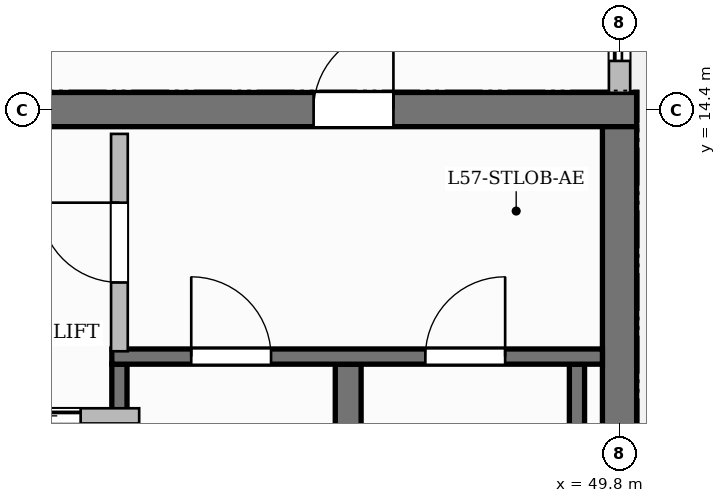
"""IFC4 building model, lengths in metres.
Left out: names, types, materials, properties, quantities, classifications, styles, units other than length and angle.
Written with IfcOpenShell. Run it as: python <this file> out.ifc"""

import sys

from ifc_helpers import new_model, si_unit, direction, frame, frame_2d, origin, place, context, subcontext, project, spatial, rectangle, extrude, source, transform, mapped, element, fill, save


model = new_model("IFC4")
c1 = context("Model", 3, precision=1e-05, world=origin(), true_north=direction((0.0, 1.0)))
c2 = subcontext(c1, "Body", "Model", "MODEL_VIEW")
j1 = project(units=[si_unit("LENGTHUNIT", "METRE"), si_unit("PLANEANGLEUNIT", "RADIAN")], contexts=[c1])
p1 = place(None, origin())
s1 = spatial("IfcSite", under=j1, at=p1, CompositionType="ELEMENT")
p2 = place(p1, origin())
s2 = spatial("IfcBuilding", under=s1, at=p2, CompositionType="ELEMENT")
p3 = place(p2, frame((0.0, 0.0, 228.85)))
s3 = spatial("IfcBuildingStorey", under=s2, at=p3, CompositionType="ELEMENT", Elevation=228.85)
p4 = place(p3, frame((34.575, 14.4, 0.0), z_axis=(0.0, 0.0, 1.0), x_axis=(1.0, 0.0, 0.0)))
e1 = element("IfcWall", 1, at=p4, inside=s3, PredefinedType="SHEAR", context=c2, shape_type="SweptSolid", body=[
    extrude(rectangle(XDim=15.45, YDim=0.45, at=frame_2d((7.725, 0.0))), origin(), (0.0, 0.0, 1.0), 3.85),
])
p5 = place(p4, frame((5.355, 0.0, 0.0)))
e2 = element("IfcOpeningElement", 2, at=p5, cuts=e1, PredefinedType="OPENING", context=c2, shape_type="SweptSolid", body=[
    extrude(rectangle(XDim=1.5, YDim=2.2, at=frame_2d((0.75, 1.1))), frame((0.0, 0.235, 0.0), z_axis=(0.0, -1.0, 0.0), x_axis=(1.0, 0.0, 0.0)), (0.0, 0.0, 1.0), 0.47),
])
p6 = place(p4, frame((1.57, 0.0, 0.0)))
e3 = element("IfcOpeningElement", 3, at=p6, cuts=e1, PredefinedType="OPENING", context=c2, shape_type="SweptSolid", body=[
    extrude(rectangle(XDim=1.05, YDim=2.15, at=frame_2d((0.525, 1.075))), frame((0.0, 0.235, 0.0), z_axis=(0.0, -1.0, 0.0), x_axis=(1.0, 0.0, 0.0)), (0.0, 0.0, 1.0), 0.47),
])
p7 = place(p4, frame((11.2, 0.0, 0.0)))
e4 = element("IfcOpeningElement", 4, at=p7, cuts=e1, PredefinedType="OPENING", context=c2, shape_type="SweptSolid", body=[
    extrude(rectangle(XDim=1.05, YDim=2.15, at=frame_2d((0.525, 1.075))), frame((0.0, 0.235, 0.0), z_axis=(0.0, -1.0, 0.0), x_axis=(1.0, 0.0, 0.0)), (0.0, 0.0, 1.0), 0.47),
])
p8 = place(p3, frame((49.8, 3.825, 0.0), z_axis=(0.0, 0.0, 1.0), x_axis=(0.0, 1.0, 0.0)))
e5 = element("IfcWall", 5, at=p8, inside=s3, PredefinedType="SHEAR", context=c2, shape_type="SweptSolid", body=[
    extrude(rectangle(XDim=10.35, YDim=0.45, at=frame_2d((5.175, 0.0))), origin(), (0.0, 0.0, 1.0), 3.85),
])
p9 = place(p3, frame((43.22, 4.1, 0.0), z_axis=(0.0, 0.0, 1.0), x_axis=(0.0, 1.0, 0.0)))
e6 = element("IfcWall", 6, at=p9, inside=s3, PredefinedType="SHEAR", context=c2, shape_type="SweptSolid", body=[
    extrude(rectangle(XDim=6.95, YDim=0.2, at=frame_2d((3.475, 0.0))), origin(), (0.0, 0.0, 1.0), 3.85),
])
p10 = place(p3, frame((46.23, 4.1, 0.0), z_axis=(0.0, 0.0, 1.0), x_axis=(0.0, 1.0, 0.0)))
e7 = element("IfcWall", 7, at=p10, inside=s3, PredefinedType="SHEAR", context=c2, shape_type="SweptSolid", body=[
    extrude(rectangle(XDim=6.95, YDim=0.34, at=frame_2d((3.475, 0.0))), origin(), (0.0, 0.0, 1.0), 3.85),
])
p11 = place(p3, frame((49.24, 4.1, 0.0), z_axis=(0.0, 0.0, 1.0), x_axis=(0.0, 1.0, 0.0)))
e8 = element("IfcWall", 8, at=p11, inside=s3, PredefinedType="SHEAR", context=c2, shape_type="SweptSolid", body=[
    extrude(rectangle(XDim=6.95, YDim=0.2, at=frame_2d((3.475, 0.0))), origin(), (0.0, 0.0, 1.0), 3.85),
])
p12 = place(p3, frame((43.12, 11.15, 0.0), z_axis=(0.0, 0.0, 1.0), x_axis=(1.0, 0.0, 0.0)))
e9 = element("IfcWall", 9, at=p12, inside=s3, PredefinedType="SHEAR", context=c2, shape_type="SweptSolid", body=[
    extrude(rectangle(XDim=6.455, YDim=0.2, at=frame_2d((3.228, 0.0))), origin(), (0.0, 0.0, 1.0), 3.85),
])
p13 = place(p12, frame((1.045, 0.0, 0.0)))
e10 = element("IfcOpeningElement", 10, at=p13, cuts=e9, PredefinedType="OPENING", context=c2, shape_type="SweptSolid", body=[
    extrude(rectangle(XDim=1.05, YDim=2.2, at=frame_2d((0.525, 1.1))), frame((0.0, 0.11, 0.0), z_axis=(0.0, -1.0, 0.0), x_axis=(1.0, 0.0, 0.0)), (0.0, 0.0, 1.0), 0.22),
])
p14 = place(p12, frame((4.125, 0.0, 0.0)))
e11 = element("IfcOpeningElement", 11, at=p14, cuts=e9, PredefinedType="OPENING", context=c2, shape_type="SweptSolid", body=[
    extrude(rectangle(XDim=1.05, YDim=2.2, at=frame_2d((0.525, 1.1))), frame((0.0, 0.11, 0.0), z_axis=(0.0, -1.0, 0.0), x_axis=(1.0, 0.0, 0.0)), (0.0, 0.0, 1.0), 0.22),
])
p15 = place(p3, frame((43.22, 11.22, 0.0), z_axis=(0.0, 0.0, 1.0), x_axis=(0.0, 1.0, 0.0)))
e12 = element("IfcWall", 12, at=p15, inside=s3, PredefinedType="PARTITIONING", context=c2, shape_type="SweptSolid", body=[
    extrude(rectangle(XDim=2.86, YDim=0.22, at=frame_2d((1.43, 0.0))), origin(), (0.0, 0.0, 1.0), 3.6),
])
p16 = place(p15, frame((0.905, 0.0, 0.0)))
e13 = element("IfcOpeningElement", 13, at=p16, cuts=e12, PredefinedType="OPENING", context=c2, shape_type="SweptSolid", body=[
    extrude(rectangle(XDim=1.05, YDim=2.15, at=frame_2d((0.525, 1.075))), frame((0.0, 0.12, 0.0), z_axis=(0.0, -1.0, 0.0), x_axis=(1.0, 0.0, 0.0)), (0.0, 0.0, 1.0), 0.24),
])
p17 = place(p3, frame((40.84, 10.37, 0.0), z_axis=(0.0, 0.0, 1.0), x_axis=(1.0, 0.0, 0.0)))
e14 = element("IfcWall", 14, at=p17, inside=s3, PredefinedType="PARTITIONING", context=c2, shape_type="SweptSolid", body=[
    extrude(rectangle(XDim=2.64, YDim=0.2, at=frame_2d((1.32, 0.0))), origin(), (0.0, 0.0, 1.0), 3.6),
])
p18 = place(p17, frame((0.77, 0.0, 0.0)))
e15 = element("IfcOpeningElement", 15, at=p18, cuts=e14, PredefinedType="OPENING", context=c2, shape_type="SweptSolid", body=[
    extrude(rectangle(XDim=1.1, YDim=2.2, at=frame_2d((0.55, 1.1))), frame((0.0, 0.11, 0.0), z_axis=(0.0, -1.0, 0.0), x_axis=(1.0, 0.0, 0.0)), (0.0, 0.0, 1.0), 0.22),
])
p19 = place(p3, frame((49.8, 14.62, 0.0), z_axis=(0.0, 0.0, 1.0), x_axis=(0.0, 1.0, 0.0)))
e16 = element("IfcWall", 16, at=p19, inside=s3, PredefinedType="SOLIDWALL", context=c2, shape_type="SweptSolid", body=[
    extrude(rectangle(XDim=6.93, YDim=0.28, at=frame_2d((3.465, 0.0))), origin(), (0.0, 0.0, 1.0), 3.135),
])
p20 = place(p19, frame((0.42, 0.0, 0.0)))
e17 = element("IfcOpeningElement", 17, at=p20, cuts=e16, PredefinedType="OPENING", context=c2, shape_type="SweptSolid", body=[
    extrude(rectangle(XDim=1.2, YDim=2.2, at=frame_2d((0.6, 1.1))), frame((0.0, 0.15, 0.0), z_axis=(0.0, -1.0, 0.0), x_axis=(1.0, 0.0, 0.0)), (0.0, 0.0, 1.0), 0.3),
])
p21 = place(p19, frame((3.384, 0.0, 0.8)))
e18 = element("IfcOpeningElement", 18, at=p21, cuts=e16, PredefinedType="OPENING", context=c2, shape_type="SweptSolid", body=[
    extrude(rectangle(XDim=1.8, YDim=1.85, at=frame_2d((0.9, 0.925))), frame((0.0, 0.15, 0.0), z_axis=(0.0, -1.0, 0.0), x_axis=(1.0, 0.0, 0.0)), (0.0, 0.0, 1.0), 0.3),
])
m1 = source(origin(), c2, "Body", "SweptSolid", [
    extrude(rectangle(XDim=1.05, YDim=2.2, at=frame_2d((0.525, 1.1))), frame((0.0, 0.025, 0.0), z_axis=(0.0, -1.0, 0.0), x_axis=(1.0, 0.0, 0.0)), (0.0, 0.0, 1.0), 0.05),
])
p22 = place(p13, origin())
e19 = element("IfcDoor", 19, at=p22, inside=s3, OperationType="SINGLE_SWING_LEFT", PredefinedType="DOOR", context=c2, shape_type="MappedRepresentation", body=[
    mapped(m1, transform((0.0, 0.0, 0.0), scale=1.0)),
])
fill(e10, e19)
p23 = place(p14, origin())
e20 = element("IfcDoor", 20, at=p23, inside=s3, OperationType="SINGLE_SWING_RIGHT", PredefinedType="DOOR", context=c2, shape_type="MappedRepresentation", body=[
    mapped(m1, transform((0.0, 0.0, 0.0), scale=1.0)),
])
fill(e11, e20)
m2 = source(origin(), c2, "Body", "SweptSolid", [
    extrude(rectangle(XDim=1.05, YDim=2.15, at=frame_2d((0.525, 1.075))), frame((0.0, 0.025, 0.0), z_axis=(0.0, -1.0, 0.0), x_axis=(1.0, 0.0, 0.0)), (0.0, 0.0, 1.0), 0.05),
])
p24 = place(p16, origin())
e21 = element("IfcDoor", 21, at=p24, inside=s3, OperationType="SINGLE_SWING_RIGHT", PredefinedType="DOOR", context=c2, shape_type="MappedRepresentation", body=[
    mapped(m2, transform((0.0, 0.0, 0.0), scale=1.0)),
])
fill(e13, e21)
p25 = place(p7, origin())
e22 = element("IfcDoor", 22, at=p25, inside=s3, OperationType="SINGLE_SWING_RIGHT", PredefinedType="DOOR", context=c2, shape_type="MappedRepresentation", body=[
    mapped(m2, transform((0.0, 0.0, 0.0), scale=1.0)),
])
fill(e4, e22)
m3 = source(origin(), c2, "Body", "SweptSolid", [
    extrude(rectangle(XDim=1.1, YDim=2.2, at=frame_2d((0.55, 1.1))), frame((0.0, 0.025, 0.0), z_axis=(0.0, -1.0, 0.0), x_axis=(1.0, 0.0, 0.0)), (0.0, 0.0, 1.0), 0.05),
])
p26 = place(p18, origin())
e23 = element("IfcDoor", 23, at=p26, inside=s3, OperationType="SLIDING_TO_LEFT", PredefinedType="DOOR", context=c2, shape_type="MappedRepresentation", body=[
    mapped(m3, transform((0.0, 0.0, 0.0), scale=1.0)),
])
fill(e15, e23)
m4 = source(origin(), c2, "Body", "SweptSolid", [
    extrude(rectangle(XDim=1.2, YDim=2.2, at=frame_2d((0.6, 1.1))), frame((0.0, 0.025, 0.0), z_axis=(0.0, -1.0, 0.0), x_axis=(1.0, 0.0, 0.0)), (0.0, 0.0, 1.0), 0.05),
])
p27 = place(p20, origin())
e24 = element("IfcDoor", 24, at=p27, inside=s3, OperationType="SLIDING_TO_LEFT", PredefinedType="DOOR", context=c2, shape_type="MappedRepresentation", body=[
    mapped(m4, transform((0.0, 0.0, 0.0), scale=1.0)),
])
fill(e17, e24)
save(model, sys.argv[1])
